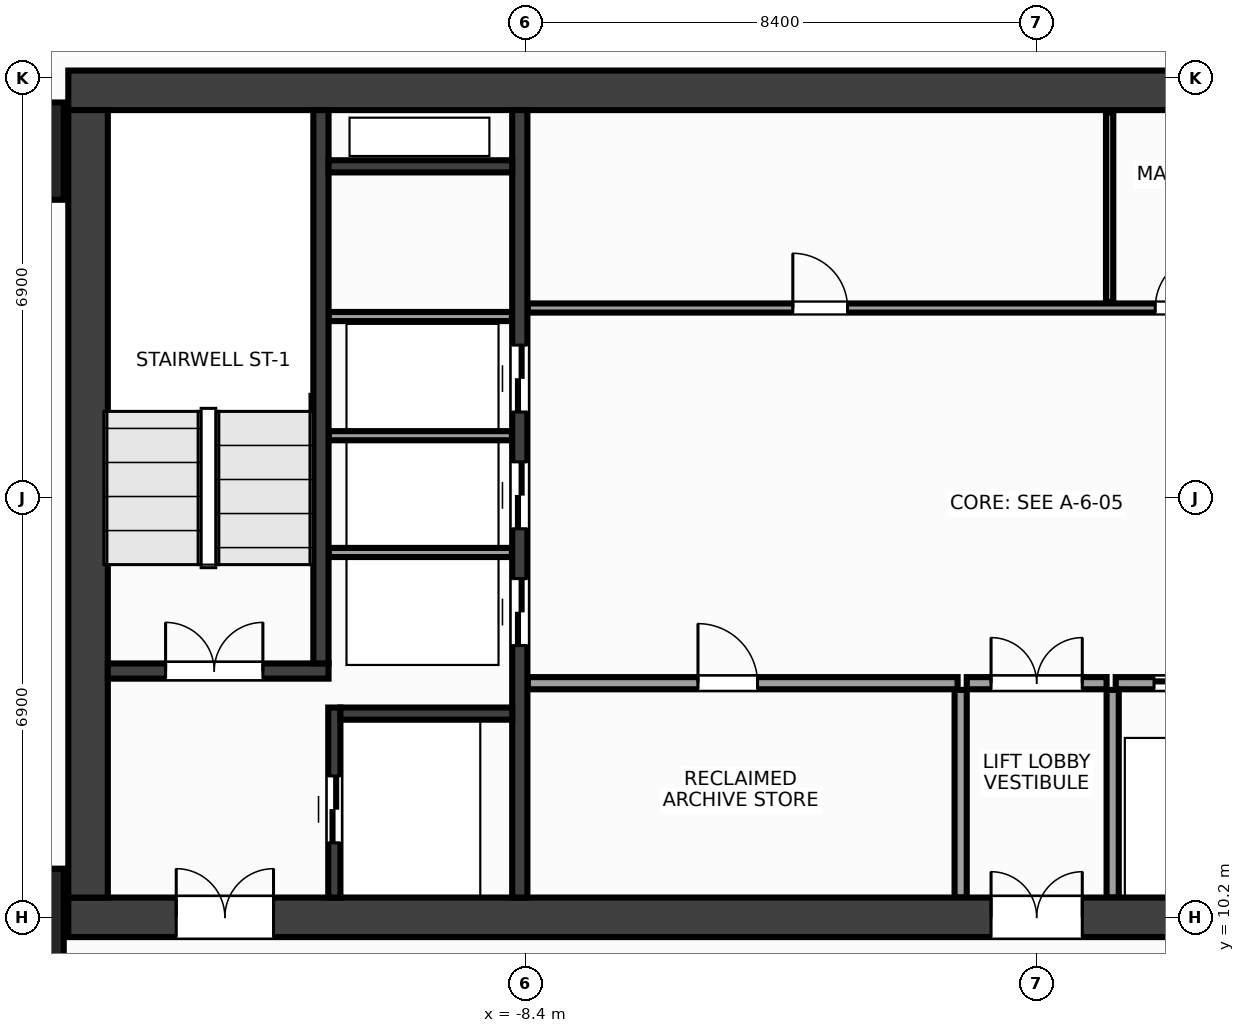
"""IFC4 building model, lengths in metres.
Left out: names, types, materials, properties, quantities, classifications, styles, units other than length and angle.
Written with IfcOpenShell. Run it as: python <this file> out.ifc"""

import sys

from ifc_helpers import new_model, si_unit, direction, frame, frame_2d, origin, origin_2d, place, context, subcontext, project, spatial, rectangle, extrude, source, transform, mapped, element, fill, save


model = new_model("IFC4")
c1 = context("Model", 3, precision=1e-05, world=origin(), true_north=direction((0.0, 1.0)))
c2 = subcontext(c1, "Body", "Model", "MODEL_VIEW")
j1 = project(units=[si_unit("LENGTHUNIT", "METRE"), si_unit("PLANEANGLEUNIT", "RADIAN")], contexts=[c1])
p1 = place(None, origin())
s1 = spatial("IfcSite", under=j1, at=p1, CompositionType="ELEMENT")
p2 = place(p1, origin())
s2 = spatial("IfcBuilding", under=s1, at=p2, CompositionType="ELEMENT")
p3 = place(p2, frame((0.0, 0.0, 171.2)))
s3 = spatial("IfcBuildingStorey", under=s2, at=p3, CompositionType="ELEMENT", Elevation=171.2)
m1 = source(origin(), c2, "Body", "SweptSolid", [
    extrude(rectangle(XDim=31.85, YDim=0.65, at=frame_2d((15.925, 0.0))), origin(), (0.0, 0.0, 1.0), 3.6),
])
p4 = place(p3, frame((-15.925, 23.8, 0.0), z_axis=(0.0, 0.0, 1.0), x_axis=(1.0, 0.0, 0.0)))
e1 = element("IfcWall", 1, at=p4, inside=s3, PredefinedType="SHEAR", context=c2, shape_type="MappedRepresentation", body=[
    mapped(m1, transform((0.0, 0.0, 0.0), x_axis=(1.0, 0.0, 0.0), y_axis=(0.0, 1.0, 0.0), z_axis=(0.0, 0.0, 1.0), scale=1.0)),
])
p5 = place(p3, frame((-15.925, 10.2, 0.0), z_axis=(0.0, 0.0, 1.0), x_axis=(1.0, 0.0, 0.0)))
e2 = element("IfcWall", 2, at=p5, inside=s3, PredefinedType="SHEAR", context=c2, shape_type="MappedRepresentation", body=[
    mapped(m1, transform((0.0, 0.0, 0.0), x_axis=(1.0, 0.0, 0.0), y_axis=(0.0, 1.0, 0.0), z_axis=(0.0, 0.0, 1.0), scale=1.0)),
])
p6 = place(p5, frame((1.775, 0.0, 0.0)))
e3 = element("IfcOpeningElement", 3, at=p6, cuts=e2, PredefinedType="OPENING", context=c2, shape_type="SweptSolid", body=[
    extrude(rectangle(XDim=1.6, YDim=2.15, at=frame_2d((0.8, 1.075))), frame((0.0, 0.337, 0.0), z_axis=(0.0, -1.0, 0.0), x_axis=(1.0, 0.0, 0.0)), (0.0, 0.0, 1.0), 0.674),
])
p7 = place(p5, frame((28.475, 0.0, 0.0)))
e4 = element("IfcOpeningElement", 4, at=p7, cuts=e2, PredefinedType="OPENING", context=c2, shape_type="SweptSolid", body=[
    extrude(rectangle(XDim=1.6, YDim=2.15, at=frame_2d((0.8, 1.075))), frame((0.0, 0.337, 0.0), z_axis=(0.0, -1.0, 0.0), x_axis=(1.0, 0.0, 0.0)), (0.0, 0.0, 1.0), 0.674),
])
p8 = place(p5, frame((15.175, 0.0, 0.0)))
e5 = element("IfcOpeningElement", 5, at=p8, cuts=e2, PredefinedType="OPENING", context=c2, shape_type="SweptSolid", body=[
    extrude(rectangle(XDim=1.5, YDim=2.2, at=frame_2d((0.75, 1.1))), frame((0.0, 0.337, 0.0), z_axis=(0.0, -1.0, 0.0), x_axis=(1.0, 0.0, 0.0)), (0.0, 0.0, 1.0), 0.674),
])
m2 = source(origin(), c2, "Body", "SweptSolid", [
    extrude(rectangle(XDim=12.95, YDim=0.65, at=frame_2d((6.475, 0.0))), origin(), (0.0, 0.0, 1.0), 3.6),
])
p9 = place(p3, frame((-15.6, 10.525, 0.0), z_axis=(0.0, 0.0, 1.0), x_axis=(0.0, 1.0, 0.0)))
e6 = element("IfcWall", 6, at=p9, inside=s3, PredefinedType="SHEAR", context=c2, shape_type="MappedRepresentation", body=[
    mapped(m2, transform((0.0, 0.0, 0.0), x_axis=(1.0, 0.0, 0.0), y_axis=(0.0, 1.0, 0.0), z_axis=(0.0, 0.0, 1.0), scale=1.0)),
])
m3 = source(origin(), c2, "Body", "SweptSolid", [
    extrude(rectangle(XDim=12.95, YDim=0.25, at=frame_2d((6.475, 0.0))), origin(), (0.0, 0.0, 1.0), 3.6),
])
p10 = place(p3, frame((-8.5, 10.525, 0.0), z_axis=(0.0, 0.0, 1.0), x_axis=(0.0, 1.0, 0.0)))
e7 = element("IfcWall", 7, at=p10, inside=s3, PredefinedType="SHEAR", context=c2, shape_type="MappedRepresentation", body=[
    mapped(m3, transform((0.0, 0.0, 0.0), x_axis=(1.0, 0.0, 0.0), y_axis=(0.0, 1.0, 0.0), z_axis=(0.0, 0.0, 1.0), scale=1.0)),
])
p11 = place(p10, frame((4.145, 0.0, 0.0)))
e8 = element("IfcOpeningElement", 8, at=p11, cuts=e7, PredefinedType="OPENING", context=c2, shape_type="SweptSolid", body=[
    extrude(rectangle(XDim=1.1, YDim=2.15, at=frame_2d((0.55, 1.075))), frame((0.0, 0.137, 0.0), z_axis=(0.0, -1.0, 0.0), x_axis=(1.0, 0.0, 0.0)), (0.0, 0.0, 1.0), 0.274),
])
p12 = place(p10, frame((6.065, 0.0, 0.0)))
e9 = element("IfcOpeningElement", 9, at=p12, cuts=e7, PredefinedType="OPENING", context=c2, shape_type="SweptSolid", body=[
    extrude(rectangle(XDim=1.1, YDim=2.15, at=frame_2d((0.55, 1.075))), frame((0.0, 0.137, 0.0), z_axis=(0.0, -1.0, 0.0), x_axis=(1.0, 0.0, 0.0)), (0.0, 0.0, 1.0), 0.274),
])
p13 = place(p10, frame((7.985, 0.0, 0.0)))
e10 = element("IfcOpeningElement", 10, at=p13, cuts=e7, PredefinedType="OPENING", context=c2, shape_type="SweptSolid", body=[
    extrude(rectangle(XDim=1.1, YDim=2.15, at=frame_2d((0.55, 1.075))), frame((0.0, 0.137, 0.0), z_axis=(0.0, -1.0, 0.0), x_axis=(1.0, 0.0, 0.0)), (0.0, 0.0, 1.0), 0.274),
])
m4 = source(origin(), c2, "Body", "SweptSolid", [
    extrude(rectangle(XDim=3.63, YDim=0.25, at=frame_2d((1.815, 0.0))), origin(), (0.0, 0.0, 1.0), 3.6),
])
p14 = place(p3, frame((-15.275, 14.25, 0.0), z_axis=(0.0, 0.0, 1.0), x_axis=(1.0, 0.0, 0.0)))
e11 = element("IfcWall", 11, at=p14, inside=s3, PredefinedType="SHEAR", context=c2, shape_type="MappedRepresentation", body=[
    mapped(m4, transform((0.0, 0.0, 0.0), x_axis=(1.0, 0.0, 0.0), y_axis=(0.0, 1.0, 0.0), z_axis=(0.0, 0.0, 1.0), scale=1.0)),
])
p15 = place(p14, frame((0.95, 0.0, 0.0)))
e12 = element("IfcOpeningElement", 12, at=p15, cuts=e11, PredefinedType="OPENING", context=c2, shape_type="SweptSolid", body=[
    extrude(rectangle(XDim=1.6, YDim=2.15, at=frame_2d((0.8, 1.075))), frame((0.0, 0.137, 0.0), z_axis=(0.0, -1.0, 0.0), x_axis=(1.0, 0.0, 0.0)), (0.0, 0.0, 1.0), 0.274),
])
m5 = source(origin(), c2, "Body", "SweptSolid", [
    extrude(rectangle(XDim=9.1, YDim=0.25, at=frame_2d((4.55, 0.0))), origin(), (0.0, 0.0, 1.0), 3.6),
])
p16 = place(p3, frame((-11.77, 14.375, 0.0), z_axis=(0.0, 0.0, 1.0), x_axis=(0.0, 1.0, 0.0)))
e13 = element("IfcWall", 13, at=p16, inside=s3, PredefinedType="SHEAR", context=c2, shape_type="MappedRepresentation", body=[
    mapped(m5, transform((0.0, 0.0, 0.0), x_axis=(1.0, 0.0, 0.0), y_axis=(0.0, 1.0, 0.0), z_axis=(0.0, 0.0, 1.0), scale=1.0)),
])
m6 = source(origin(), c2, "Body", "SweptSolid", [
    extrude(rectangle(XDim=3.125, YDim=0.2, at=frame_2d((1.562, 0.0))), origin(), (0.0, 0.0, 1.0), 3.6),
])
p17 = place(p3, frame((-11.55, 10.525, 0.0), z_axis=(0.0, 0.0, 1.0), x_axis=(0.0, 1.0, 0.0)))
e14 = element("IfcWall", 14, at=p17, inside=s3, PredefinedType="SHEAR", context=c2, shape_type="MappedRepresentation", body=[
    mapped(m6, transform((0.0, 0.0, 0.0), x_axis=(1.0, 0.0, 0.0), y_axis=(0.0, 1.0, 0.0), z_axis=(0.0, 0.0, 1.0), scale=1.0)),
])
p18 = place(p17, frame((0.9, 0.0, 0.0)))
e15 = element("IfcOpeningElement", 15, at=p18, cuts=e14, PredefinedType="OPENING", context=c2, shape_type="SweptSolid", body=[
    extrude(rectangle(XDim=1.1, YDim=2.15, at=frame_2d((0.55, 1.075))), frame((0.0, 0.112, 0.0), z_axis=(0.0, -1.0, 0.0), x_axis=(1.0, 0.0, 0.0)), (0.0, 0.0, 1.0), 0.224),
])
m7 = source(origin(), c2, "Body", "SweptSolid", [
    extrude(rectangle(XDim=2.825, YDim=0.2, at=frame_2d((1.413, 0.0))), origin(), (0.0, 0.0, 1.0), 3.6),
])
p19 = place(p3, frame((-11.45, 13.55, 0.0), z_axis=(0.0, 0.0, 1.0), x_axis=(1.0, 0.0, 0.0)))
e16 = element("IfcWall", 16, at=p19, inside=s3, PredefinedType="SHEAR", context=c2, shape_type="MappedRepresentation", body=[
    mapped(m7, transform((0.0, 0.0, 0.0), x_axis=(1.0, 0.0, 0.0), y_axis=(0.0, 1.0, 0.0), z_axis=(0.0, 0.0, 1.0), scale=1.0)),
])
m8 = source(origin(), c2, "Body", "SweptSolid", [
    extrude(rectangle(XDim=3.02, YDim=0.2, at=frame_2d((1.51, 0.0))), origin(), (0.0, 0.0, 1.0), 3.6),
])
p20 = place(p3, frame((-11.645, 22.55, 0.0), z_axis=(0.0, 0.0, 1.0), x_axis=(1.0, 0.0, 0.0)))
e17 = element("IfcWall", 17, at=p20, inside=s3, PredefinedType="SHEAR", context=c2, shape_type="MappedRepresentation", body=[
    mapped(m8, transform((0.0, 0.0, 0.0), x_axis=(1.0, 0.0, 0.0), y_axis=(0.0, 1.0, 0.0), z_axis=(0.0, 0.0, 1.0), scale=1.0)),
])
m9 = source(origin(), c2, "Body", "SweptSolid", [
    extrude(rectangle(XDim=1.6, YDim=1.6, at=origin_2d()), origin(), (0.0, 0.0, 1.0), 3.6),
])
for number, where, z_axis, x_axis in (
    (18, (-16.8, 10.2, 0.0), (0.0, 0.0, 1.0), (1.0, 0.0, 0.0)),
    (19, (-16.8, 22.8, 0.0), (0.0, 0.0, 1.0), (1.0, 0.0, 0.0)),
):
    element("IfcColumn", number, at=place(p3, frame(where, z_axis=z_axis, x_axis=x_axis)), inside=s3, PredefinedType="COLUMN", context=c2, shape_type="MappedRepresentation", body=[
        mapped(m9, transform((0.0, 0.0, 0.0), x_axis=(1.0, 0.0, 0.0), y_axis=(0.0, 1.0, 0.0), z_axis=(0.0, 0.0, 1.0), scale=1.0)),
    ])
m10 = source(origin(), c2, "Body", "SweptSolid", [
    extrude(rectangle(XDim=3.01, YDim=0.15, at=frame_2d((1.505, 0.0))), origin(), (0.0, 0.0, 1.0), 3.38),
])
for number, where, z_axis, x_axis in (
    (20, (-11.64, 16.2, 0.0), (0.0, 0.0, 1.0), (1.0, 0.0, 0.0)),
    (21, (-11.64, 18.12, 0.0), (0.0, 0.0, 1.0), (1.0, 0.0, 0.0)),
    (22, (-11.64, 20.08, 0.0), (0.0, 0.0, 1.0), (1.0, 0.0, 0.0)),
):
    element("IfcWall", number, at=place(p3, frame(where, z_axis=z_axis, x_axis=x_axis)), inside=s3, PredefinedType="PARTITIONING", context=c2, shape_type="MappedRepresentation", body=[
        mapped(m10, transform((0.0, 0.0, 0.0), x_axis=(1.0, 0.0, 0.0), y_axis=(0.0, 1.0, 0.0), z_axis=(0.0, 0.0, 1.0), scale=1.0)),
    ])
m11 = source(origin(), c2, "Body", "SweptSolid", [
    extrude(rectangle(XDim=7.07, YDim=0.2, at=frame_2d((3.535, 0.0))), origin(), (0.0, 0.0, 1.0), 3.38),
])
p21 = place(p3, frame((-8.37, 14.05, 0.0), z_axis=(0.0, 0.0, 1.0), x_axis=(1.0, 0.0, 0.0)))
e23 = element("IfcWall", 23, at=p21, inside=s3, PredefinedType="PARTITIONING", context=c2, shape_type="MappedRepresentation", body=[
    mapped(m11, transform((0.0, 0.0, 0.0), x_axis=(1.0, 0.0, 0.0), y_axis=(0.0, 1.0, 0.0), z_axis=(0.0, 0.0, 1.0), scale=1.0)),
])
p22 = place(p21, frame((2.8, 0.0, 0.0)))
e24 = element("IfcOpeningElement", 24, at=p22, cuts=e23, PredefinedType="OPENING", context=c2, shape_type="SweptSolid", body=[
    extrude(rectangle(XDim=0.98, YDim=2.15, at=frame_2d((0.49, 1.075))), frame((0.0, 0.112, 0.0), z_axis=(0.0, -1.0, 0.0), x_axis=(1.0, 0.0, 0.0)), (0.0, 0.0, 1.0), 0.224),
])
p23 = place(p3, frame((1.3, 14.05, 0.0), z_axis=(0.0, 0.0, 1.0), x_axis=(1.0, 0.0, 0.0)))
e25 = element("IfcWall", 25, at=p23, inside=s3, PredefinedType="PARTITIONING", context=c2, shape_type="MappedRepresentation", body=[
    mapped(m11, transform((0.0, 0.0, 0.0), x_axis=(1.0, 0.0, 0.0), y_axis=(0.0, 1.0, 0.0), z_axis=(0.0, 0.0, 1.0), scale=1.0)),
])
p24 = place(p23, frame((0.63, 0.0, 0.0)))
e26 = element("IfcOpeningElement", 26, at=p24, cuts=e25, PredefinedType="OPENING", context=c2, shape_type="SweptSolid", body=[
    extrude(rectangle(XDim=1.1, YDim=2.15, at=frame_2d((0.55, 1.075))), frame((0.0, 0.112, 0.0), z_axis=(0.0, -1.0, 0.0), x_axis=(1.0, 0.0, 0.0)), (0.0, 0.0, 1.0), 0.224),
])
p25 = place(p23, frame((2.98, 0.0, 0.0)))
e27 = element("IfcOpeningElement", 27, at=p25, cuts=e25, PredefinedType="OPENING", context=c2, shape_type="SweptSolid", body=[
    extrude(rectangle(XDim=1.1, YDim=2.15, at=frame_2d((0.55, 1.075))), frame((0.0, 0.112, 0.0), z_axis=(0.0, -1.0, 0.0), x_axis=(1.0, 0.0, 0.0)), (0.0, 0.0, 1.0), 0.224),
])
p26 = place(p23, frame((5.33, 0.0, 0.0)))
e28 = element("IfcOpeningElement", 28, at=p26, cuts=e25, PredefinedType="OPENING", context=c2, shape_type="SweptSolid", body=[
    extrude(rectangle(XDim=1.1, YDim=2.15, at=frame_2d((0.55, 1.075))), frame((0.0, 0.112, 0.0), z_axis=(0.0, -1.0, 0.0), x_axis=(1.0, 0.0, 0.0)), (0.0, 0.0, 1.0), 0.224),
])
m12 = source(origin(), c2, "Body", "SweptSolid", [
    extrude(rectangle(XDim=3.415, YDim=0.2, at=frame_2d((1.708, 0.0))), origin(), (0.0, 0.0, 1.0), 3.38),
])
for number, where, z_axis, x_axis in (
    (29, (-1.25, 10.525, 0.0), (0.0, 0.0, 1.0), (0.0, 1.0, 0.0)),
    (30, (1.25, 10.525, 0.0), (0.0, 0.0, 1.0), (0.0, 1.0, 0.0)),
):
    element("IfcWall", number, at=place(p3, frame(where, z_axis=z_axis, x_axis=x_axis)), inside=s3, PredefinedType="PARTITIONING", context=c2, shape_type="MappedRepresentation", body=[
        mapped(m12, transform((0.0, 0.0, 0.0), x_axis=(1.0, 0.0, 0.0), y_axis=(0.0, 1.0, 0.0), z_axis=(0.0, 0.0, 1.0), scale=1.0)),
    ])
m13 = source(origin(), c2, "Body", "SweptSolid", [
    extrude(rectangle(XDim=2.3, YDim=0.2, at=frame_2d((1.15, 0.0))), origin(), (0.0, 0.0, 1.0), 3.38),
])
p27 = place(p3, frame((-1.15, 14.05, 0.0), z_axis=(0.0, 0.0, 1.0), x_axis=(1.0, 0.0, 0.0)))
e31 = element("IfcWall", 31, at=p27, inside=s3, PredefinedType="PARTITIONING", context=c2, shape_type="MappedRepresentation", body=[
    mapped(m13, transform((0.0, 0.0, 0.0), x_axis=(1.0, 0.0, 0.0), y_axis=(0.0, 1.0, 0.0), z_axis=(0.0, 0.0, 1.0), scale=1.0)),
])
p28 = place(p27, frame((0.4, 0.0, 0.0)))
e32 = element("IfcOpeningElement", 32, at=p28, cuts=e31, PredefinedType="OPENING", context=c2, shape_type="SweptSolid", body=[
    extrude(rectangle(XDim=1.5, YDim=2.2, at=frame_2d((0.75, 1.1))), frame((0.0, 0.112, 0.0), z_axis=(0.0, -1.0, 0.0), x_axis=(1.0, 0.0, 0.0)), (0.0, 0.0, 1.0), 0.224),
])
m14 = source(origin(), c2, "Body", "SweptSolid", [
    extrude(rectangle(XDim=14.59, YDim=0.15, at=frame_2d((7.295, 0.0))), origin(), (0.0, 0.0, 1.0), 3.38),
])
p29 = place(p3, frame((-8.37, 20.22, 0.0), z_axis=(0.0, 0.0, 1.0), x_axis=(1.0, 0.0, 0.0)))
e33 = element("IfcWall", 33, at=p29, inside=s3, PredefinedType="PARTITIONING", context=c2, shape_type="MappedRepresentation", body=[
    mapped(m14, transform((0.0, 0.0, 0.0), x_axis=(1.0, 0.0, 0.0), y_axis=(0.0, 1.0, 0.0), z_axis=(0.0, 0.0, 1.0), scale=1.0)),
])
p30 = place(p29, frame((4.36, 0.0, 0.0)))
e34 = element("IfcOpeningElement", 34, at=p30, cuts=e33, PredefinedType="OPENING", context=c2, shape_type="SweptSolid", body=[
    extrude(rectangle(XDim=0.9, YDim=2.15, at=frame_2d((0.45, 1.075))), frame((0.0, 0.087, 0.0), z_axis=(0.0, -1.0, 0.0), x_axis=(1.0, 0.0, 0.0)), (0.0, 0.0, 1.0), 0.174),
])
p31 = place(p29, frame((10.32, 0.0, 0.0)))
e35 = element("IfcOpeningElement", 35, at=p31, cuts=e33, PredefinedType="OPENING", context=c2, shape_type="SweptSolid", body=[
    extrude(rectangle(XDim=0.9, YDim=2.15, at=frame_2d((0.45, 1.075))), frame((0.0, 0.087, 0.0), z_axis=(0.0, -1.0, 0.0), x_axis=(1.0, 0.0, 0.0)), (0.0, 0.0, 1.0), 0.174),
])
p32 = place(p29, frame((12.77, 0.0, 0.0)))
e36 = element("IfcOpeningElement", 36, at=p32, cuts=e33, PredefinedType="OPENING", context=c2, shape_type="SweptSolid", body=[
    extrude(rectangle(XDim=0.9, YDim=2.15, at=frame_2d((0.45, 1.075))), frame((0.0, 0.087, 0.0), z_axis=(0.0, -1.0, 0.0), x_axis=(1.0, 0.0, 0.0)), (0.0, 0.0, 1.0), 0.174),
])
m15 = source(origin(), c2, "Body", "SweptSolid", [
    extrude(rectangle(XDim=3.115, YDim=0.12, at=frame_2d((1.558, 0.0))), origin(), (0.0, 0.0, 1.0), 3.38),
])
p33 = place(p3, frame((1.2, 20.32, 0.0), z_axis=(0.0, 0.0, 1.0), x_axis=(0.0, 1.0, 0.0)))
e37 = element("IfcWall", 37, at=p33, inside=s3, PredefinedType="PARTITIONING", context=c2, shape_type="MappedRepresentation", body=[
    mapped(m15, transform((0.0, 0.0, 0.0), x_axis=(1.0, 0.0, 0.0), y_axis=(0.0, 1.0, 0.0), z_axis=(0.0, 0.0, 1.0), scale=1.0)),
])
m16 = source(origin(), c2, "Body", "SweptSolid", [
    extrude(rectangle(XDim=1.6, YDim=2.15, at=frame_2d((0.8, 1.075))), frame((0.0, 0.025, 0.0), z_axis=(0.0, -1.0, 0.0), x_axis=(1.0, 0.0, 0.0)), (0.0, 0.0, 1.0), 0.05),
])
p34 = place(p15, origin())
e38 = element("IfcDoor", 38, at=p34, inside=s3, OperationType="DOUBLE_DOOR_SINGLE_SWING", PredefinedType="DOOR", context=c2, shape_type="MappedRepresentation", body=[
    mapped(m16, transform((0.0, 0.0, 0.0), x_axis=(1.0, 0.0, 0.0), y_axis=(0.0, 1.0, 0.0), z_axis=(0.0, 0.0, 1.0), scale=1.0)),
])
fill(e12, e38)
p35 = place(p6, origin())
e39 = element("IfcDoor", 39, at=p35, inside=s3, OperationType="DOUBLE_DOOR_SINGLE_SWING", PredefinedType="DOOR", context=c2, shape_type="MappedRepresentation", body=[
    mapped(m16, transform((0.0, 0.0, 0.0), x_axis=(1.0, 0.0, 0.0), y_axis=(0.0, 1.0, 0.0), z_axis=(0.0, 0.0, 1.0), scale=1.0)),
])
fill(e3, e39)
m17 = source(origin(), c2, "Body", "SweptSolid", [
    extrude(rectangle(XDim=1.1, YDim=2.15, at=frame_2d((0.55, 1.075))), frame((0.0, 0.025, 0.0), z_axis=(0.0, -1.0, 0.0), x_axis=(1.0, 0.0, 0.0)), (0.0, 0.0, 1.0), 0.05),
])
p36 = place(p18, origin())
e40 = element("IfcDoor", 40, at=p36, inside=s3, OperationType="DOUBLE_DOOR_SLIDING", PredefinedType="DOOR", context=c2, shape_type="MappedRepresentation", body=[
    mapped(m17, transform((0.0, 0.0, 0.0), x_axis=(1.0, 0.0, 0.0), y_axis=(0.0, 1.0, 0.0), z_axis=(0.0, 0.0, 1.0), scale=1.0)),
])
fill(e15, e40)
p37 = place(p11, origin())
e41 = element("IfcDoor", 41, at=p37, inside=s3, OperationType="DOUBLE_DOOR_SLIDING", PredefinedType="DOOR", context=c2, shape_type="MappedRepresentation", body=[
    mapped(m17, transform((0.0, 0.0, 0.0), x_axis=(1.0, 0.0, 0.0), y_axis=(0.0, 1.0, 0.0), z_axis=(0.0, 0.0, 1.0), scale=1.0)),
])
fill(e8, e41)
p38 = place(p12, origin())
e42 = element("IfcDoor", 42, at=p38, inside=s3, OperationType="DOUBLE_DOOR_SLIDING", PredefinedType="DOOR", context=c2, shape_type="MappedRepresentation", body=[
    mapped(m17, transform((0.0, 0.0, 0.0), x_axis=(1.0, 0.0, 0.0), y_axis=(0.0, 1.0, 0.0), z_axis=(0.0, 0.0, 1.0), scale=1.0)),
])
fill(e9, e42)
p39 = place(p13, origin())
e43 = element("IfcDoor", 43, at=p39, inside=s3, OperationType="DOUBLE_DOOR_SLIDING", PredefinedType="DOOR", context=c2, shape_type="MappedRepresentation", body=[
    mapped(m17, transform((0.0, 0.0, 0.0), x_axis=(1.0, 0.0, 0.0), y_axis=(0.0, 1.0, 0.0), z_axis=(0.0, 0.0, 1.0), scale=1.0)),
])
fill(e10, e43)
m18 = source(origin(), c2, "Body", "SweptSolid", [
    extrude(rectangle(XDim=0.98, YDim=2.15, at=frame_2d((0.49, 1.075))), frame((0.0, 0.025, 0.0), z_axis=(0.0, -1.0, 0.0), x_axis=(1.0, 0.0, 0.0)), (0.0, 0.0, 1.0), 0.05),
])
p40 = place(p22, origin())
e44 = element("IfcDoor", 44, at=p40, inside=s3, OperationType="SINGLE_SWING_LEFT", PredefinedType="DOOR", context=c2, shape_type="MappedRepresentation", body=[
    mapped(m18, transform((0.0, 0.0, 0.0), x_axis=(1.0, 0.0, 0.0), y_axis=(0.0, 1.0, 0.0), z_axis=(0.0, 0.0, 1.0), scale=1.0)),
])
fill(e24, e44)
p41 = place(p24, origin())
e45 = element("IfcDoor", 45, at=p41, inside=s3, OperationType="DOUBLE_DOOR_SLIDING", PredefinedType="DOOR", context=c2, shape_type="MappedRepresentation", body=[
    mapped(m17, transform((0.0, 0.0, 0.0), x_axis=(1.0, 0.0, 0.0), y_axis=(0.0, 1.0, 0.0), z_axis=(0.0, 0.0, 1.0), scale=1.0)),
])
fill(e26, e45)
m19 = source(origin(), c2, "Body", "SweptSolid", [
    extrude(rectangle(XDim=1.5, YDim=2.2, at=frame_2d((0.75, 1.1))), frame((0.0, 0.025, 0.0), z_axis=(0.0, -1.0, 0.0), x_axis=(1.0, 0.0, 0.0)), (0.0, 0.0, 1.0), 0.05),
])
p42 = place(p28, origin())
e46 = element("IfcDoor", 46, at=p42, inside=s3, OperationType="DOUBLE_DOOR_SINGLE_SWING", PredefinedType="DOOR", context=c2, shape_type="MappedRepresentation", body=[
    mapped(m19, transform((0.0, 0.0, 0.0), x_axis=(1.0, 0.0, 0.0), y_axis=(0.0, 1.0, 0.0), z_axis=(0.0, 0.0, 1.0), scale=1.0)),
])
fill(e32, e46)
p43 = place(p8, origin())
e47 = element("IfcDoor", 47, at=p43, inside=s3, OperationType="DOUBLE_DOOR_SINGLE_SWING", PredefinedType="DOOR", context=c2, shape_type="MappedRepresentation", body=[
    mapped(m19, transform((0.0, 0.0, 0.0), x_axis=(1.0, 0.0, 0.0), y_axis=(0.0, 1.0, 0.0), z_axis=(0.0, 0.0, 1.0), scale=1.0)),
])
fill(e5, e47)
m20 = source(origin(), c2, "Body", "SweptSolid", [
    extrude(rectangle(XDim=0.9, YDim=2.15, at=frame_2d((0.45, 1.075))), frame((0.0, 0.025, 0.0), z_axis=(0.0, -1.0, 0.0), x_axis=(1.0, 0.0, 0.0)), (0.0, 0.0, 1.0), 0.05),
])
p44 = place(p30, origin())
e48 = element("IfcDoor", 48, at=p44, inside=s3, OperationType="SINGLE_SWING_LEFT", PredefinedType="DOOR", context=c2, shape_type="MappedRepresentation", body=[
    mapped(m20, transform((0.0, 0.0, 0.0), x_axis=(1.0, 0.0, 0.0), y_axis=(0.0, 1.0, 0.0), z_axis=(0.0, 0.0, 1.0), scale=1.0)),
])
fill(e34, e48)
p45 = place(p31, origin())
e49 = element("IfcDoor", 49, at=p45, inside=s3, OperationType="SINGLE_SWING_RIGHT", PredefinedType="DOOR", context=c2, shape_type="MappedRepresentation", body=[
    mapped(m20, transform((0.0, 0.0, 0.0), x_axis=(1.0, 0.0, 0.0), y_axis=(0.0, 1.0, 0.0), z_axis=(0.0, 0.0, 1.0), scale=1.0)),
])
fill(e35, e49)
save(model, sys.argv[1])
